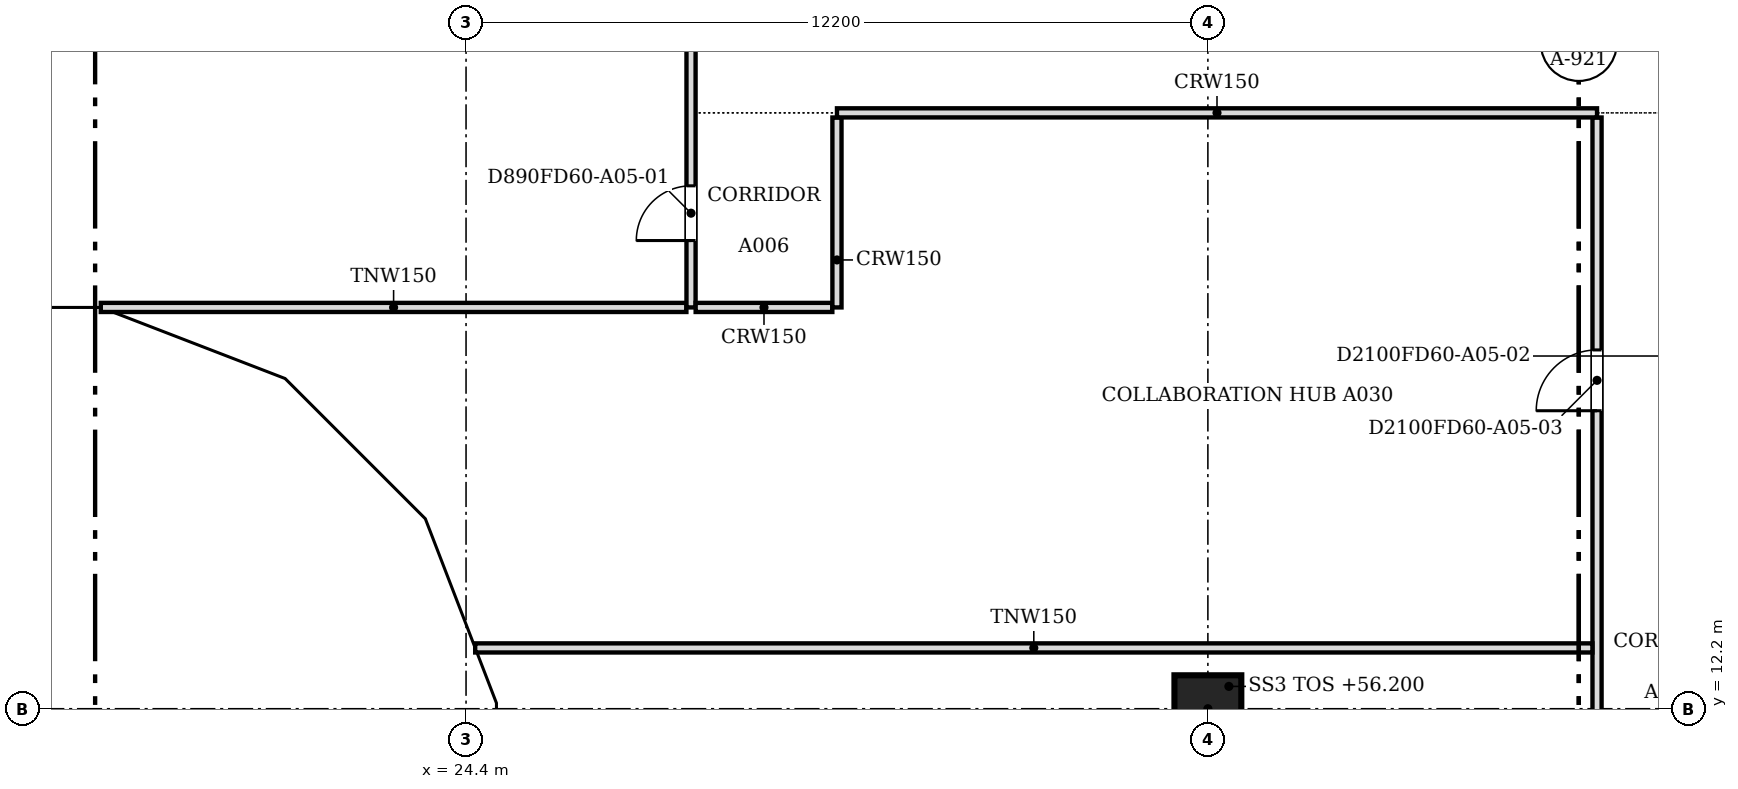
"""IFC4 building model, lengths in metres.
Left out: names, types, materials, properties, quantities, classifications, styles, units other than length and angle.
Written with IfcOpenShell. Run it as: python <this file> out.ifc"""

import sys

from ifc_helpers import new_model, si_unit, direction, frame, frame_2d, origin, origin_2d, place, context, subcontext, project, spatial, polyline, rectangle, outline, extrude, faceted_brep, source, transform, mapped, element, fill, save


model = new_model("IFC4")
c1 = context("Model", 3, precision=1e-05, world=origin(), true_north=direction((0.0, 1.0)))
c2 = subcontext(c1, "Body", "Model", "MODEL_VIEW")
j1 = project(units=[si_unit("LENGTHUNIT", "METRE"), si_unit("PLANEANGLEUNIT", "RADIAN")], contexts=[c1])
p1 = place(None, origin())
s1 = spatial("IfcSite", under=j1, at=p1, CompositionType="ELEMENT")
p2 = place(p1, origin())
s2 = spatial("IfcBuilding", under=s1, at=p2, CompositionType="ELEMENT")
p3 = place(p2, frame((0.0, 0.0, 56.2)))
s3 = spatial("IfcBuildingStorey", under=s2, at=p3, CompositionType="ELEMENT", Elevation=56.2)
p4 = place(p3, frame((36.6, 12.2, 0.0), z_axis=(0.0, 0.0, 1.0), x_axis=(1.0, 0.0, 0.0)))
e1 = element("IfcColumn", 1, at=p4, inside=s3, PredefinedType="COLUMN", context=c2, shape_type="SweptSolid", body=[
    extrude(rectangle(XDim=1.1, YDim=1.1, at=origin_2d()), origin(), (0.0, 0.0, 1.0), 3.6),
])
m1 = source(origin(), c2, "Body", "Brep", [
    faceted_brep([(3.05, -0.25, 7.543), (0.0, -0.25, 3.8), (3.05, -0.25, 0.057), (0.0, 0.25, 3.8), (3.096, 0.25, 7.6), (3.143, 0.25, 7.544), (3.143, 0.25, 0.056), (3.096, 0.25, 0.0), (3.096, -0.0, 0.0), (3.096, -0.0, 7.6)], [[[0, 1, 2]], [[3, 4, 5, 6, 7]], [[7, 6, 8]], [[5, 4, 9]], [[4, 3, 1, 0, 9]], [[3, 7, 8, 2, 1]], [[2, 8, 6, 5, 9, 0]]]),
])
p5 = place(p3, frame((15.25, 18.55, -3.8), z_axis=(0.0, 0.0, 1.0), x_axis=(1.0, 0.0, 0.0)))
e2 = element("IfcWall", 2, at=p5, inside=s3, PredefinedType="SOLIDWALL", context=c2, shape_type="MappedRepresentation", body=[
    mapped(m1, transform((0.0, 0.0, 0.0), scale=1.0)),
])
m2 = source(origin(), c2, "Body", "SweptSolid", [
    extrude(outline(polyline([(2.896, 6.959), (0.323, 3.8), (2.896, 0.641), (2.896, 6.959)])), frame((0.0, 0.26, 0.0), z_axis=(0.0, -1.0, 0.0), x_axis=(1.0, 0.0, 0.0)), (0.0, 0.0, 1.0), 0.52),
])
p6 = place(p5, origin())
e3 = element("IfcOpeningElement", 3, at=p6, cuts=e2, PredefinedType="OPENING", context=c2, shape_type="MappedRepresentation", body=[
    mapped(m2, transform((0.0, 0.0, 0.0), scale=1.0)),
])
m3 = source(origin(), c2, "Body", "Brep", [
    faceted_brep([(0.093, -0.25, 0.056), (3.143, -0.25, 3.736), (3.143, -0.25, 3.864), (0.093, -0.25, 7.544), (0.0, 0.25, 7.543), (0.047, 0.25, 7.6), (3.196, 0.25, 3.8), (0.047, 0.25, 0.0), (0.0, 0.25, 0.057), (3.196, -0.0, 3.8), (0.047, 0.0, 0.0), (0.047, 0.0, 7.6)], [[[0, 1, 2, 3]], [[4, 5, 6, 7, 8]], [[7, 6, 9, 1, 0, 10]], [[6, 5, 11, 3, 2, 9]], [[5, 4, 11]], [[8, 7, 10]], [[8, 10, 0, 3, 11, 4]], [[1, 9, 2]]]),
])
p7 = place(p3, frame((18.303, 18.567, -3.8), z_axis=(0.0, 0.0, 1.0), x_axis=(0.932978940178, -0.359930961693, 0.0)))
e4 = element("IfcWall", 4, at=p7, inside=s3, PredefinedType="SOLIDWALL", context=c2, shape_type="MappedRepresentation", body=[
    mapped(m3, transform((0.0, 0.0, 0.0), scale=1.0)),
])
m4 = source(origin(), c2, "Body", "SweptSolid", [
    extrude(outline(polyline([(0.247, 0.633), (2.871, 3.8), (0.247, 6.967), (0.247, 0.633)])), frame((0.0, 0.26, 0.0), z_axis=(0.0, -1.0, 0.0), x_axis=(1.0, 0.0, 0.0)), (0.0, 0.0, 1.0), 0.52),
])
p8 = place(p7, origin())
e5 = element("IfcOpeningElement", 5, at=p8, cuts=e4, PredefinedType="OPENING", context=c2, shape_type="MappedRepresentation", body=[
    mapped(m4, transform((0.0, 0.0, 0.0), scale=1.0)),
])
m5 = source(origin(), c2, "Body", "Brep", [
    faceted_brep([(3.103, -0.25, 7.536), (0.053, -0.25, 3.864), (0.053, -0.25, 3.736), (3.103, -0.25, 0.064), (0.0, 0.25, 3.8), (3.156, 0.25, 7.6), (3.209, 0.25, 7.536), (3.209, 0.25, 0.064), (3.156, 0.25, 0.0), (3.156, -0.0, 0.0), (3.156, -0.0, 7.6), (0.0, 0.0, 3.8)], [[[0, 1, 2, 3]], [[4, 5, 6, 7, 8]], [[8, 7, 9]], [[6, 5, 10]], [[5, 4, 11, 1, 0, 10]], [[4, 8, 9, 3, 2, 11]], [[11, 2, 1]], [[3, 9, 7, 6, 10, 0]]]),
])
p9 = place(p3, frame((21.285, 17.417, -3.8), z_axis=(0.0, 0.0, 1.0), x_axis=(0.707106781187, -0.707106781187, 0.0)))
e6 = element("IfcWall", 6, at=p9, inside=s3, PredefinedType="SOLIDWALL", context=c2, shape_type="MappedRepresentation", body=[
    mapped(m5, transform((0.0, 0.0, 0.0), scale=1.0)),
])
m6 = source(origin(), c2, "Body", "SweptSolid", [
    extrude(outline(polyline([(2.956, 6.968), (0.325, 3.8), (2.956, 0.632), (2.956, 6.968)])), frame((0.0, 0.26, 0.0), z_axis=(0.0, -1.0, 0.0), x_axis=(1.0, 0.0, 0.0)), (0.0, 0.0, 1.0), 0.52),
])
p10 = place(p9, origin())
e7 = element("IfcOpeningElement", 7, at=p10, cuts=e6, PredefinedType="OPENING", context=c2, shape_type="MappedRepresentation", body=[
    mapped(m6, transform((0.0, 0.0, 0.0), scale=1.0)),
])
m7 = source(origin(), c2, "Body", "Brep", [
    faceted_brep([(0.106, -0.25, 0.064), (3.156, -0.25, 3.744), (3.156, -0.25, 3.856), (0.106, -0.25, 7.536), (0.0, 0.25, 7.536), (0.053, 0.25, 7.6), (3.202, 0.25, 3.8), (0.053, 0.25, 0.0), (0.0, 0.25, 0.064), (3.202, -0.0, 3.8), (0.053, 0.0, 0.0), (0.053, 0.0, 7.6)], [[[0, 1, 2, 3]], [[4, 5, 6, 7, 8]], [[7, 6, 9, 1, 0, 10]], [[6, 5, 11, 3, 2, 9]], [[5, 4, 11]], [[8, 7, 10]], [[8, 10, 0, 3, 11, 4]], [[1, 9, 2]]]),
])
p11 = place(p3, frame((23.497, 15.234, -3.8), z_axis=(0.0, 0.0, 1.0), x_axis=(0.359913782069, -0.932985567668, 0.0)))
e8 = element("IfcWall", 8, at=p11, inside=s3, PredefinedType="SOLIDWALL", context=c2, shape_type="MappedRepresentation", body=[
    mapped(m7, transform((0.0, 0.0, 0.0), scale=1.0)),
])
m8 = source(origin(), c2, "Body", "SweptSolid", [
    extrude(outline(polyline([(0.253, 0.633), (2.878, 3.8), (0.253, 6.967), (0.253, 0.633)])), frame((0.0, 0.26, 0.0), z_axis=(0.0, -1.0, 0.0), x_axis=(1.0, 0.0, 0.0)), (0.0, 0.0, 1.0), 0.52),
])
p12 = place(p11, origin())
e9 = element("IfcOpeningElement", 9, at=p12, cuts=e8, PredefinedType="OPENING", context=c2, shape_type="MappedRepresentation", body=[
    mapped(m8, transform((0.0, 0.0, 0.0), scale=1.0)),
])
m9 = source(origin(), c2, "Body", "Brep", [
    faceted_brep([(3.096, -0.25, 0.0), (6.1, -0.25, 3.8), (3.096, -0.25, 7.6), (0.047, -0.25, 3.857), (0.047, -0.25, 3.743), (0.0, 0.25, 3.8), (3.096, 0.25, 7.6), (6.053, 0.25, 3.859), (6.053, 0.25, 3.741), (3.096, 0.25, 0.0), (6.1, -0.0, 3.8), (0.0, 0.0, 3.8)], [[[0, 1, 2, 3, 4]], [[5, 6, 7, 8, 9]], [[9, 8, 10, 1, 0]], [[7, 6, 2, 1, 10]], [[6, 5, 11, 3, 2]], [[5, 9, 0, 4, 11]], [[11, 4, 3]], [[10, 8, 7]]]),
])
p13 = place(p3, frame((24.65, 12.247, -3.8), z_axis=(0.0, 0.0, 1.0), x_axis=(0.0, -1.0, 0.0)))
e10 = element("IfcWall", 10, at=p13, inside=s3, PredefinedType="SOLIDWALL", context=c2, shape_type="MappedRepresentation", body=[
    mapped(m9, transform((0.0, 0.0, 0.0), scale=1.0)),
])
m10 = source(origin(), c2, "Body", "SweptSolid", [
    extrude(outline(polyline([(3.094, 0.399), (5.781, 3.8), (3.094, 7.201), (0.323, 3.8), (3.094, 0.399)])), frame((0.0, 0.26, 0.0), z_axis=(0.0, -1.0, 0.0), x_axis=(1.0, 0.0, 0.0)), (0.0, 0.0, 1.0), 0.52),
])
p14 = place(p13, origin())
e11 = element("IfcOpeningElement", 11, at=p14, cuts=e10, PredefinedType="OPENING", context=c2, shape_type="MappedRepresentation", body=[
    mapped(m10, transform((0.0, 0.0, 0.0), scale=1.0)),
])
p15 = place(p2, frame((0.0, 0.0, 60.0)))
s4 = spatial("IfcBuildingStorey", under=s2, at=p15, CompositionType="ELEMENT", Elevation=60.0)
m11 = source(origin(), c2, "Body", "Brep", [
    faceted_brep([(3.05, -0.25, 0.0), (6.1, -0.25, 3.743), (6.1, -0.25, 3.857), (3.05, -0.25, 7.6), (0.0, -0.25, 3.8), (0.0, 0.25, 3.8), (3.05, 0.25, 7.6), (6.146, 0.25, 3.8), (3.05, 0.25, 0.0), (6.146, -0.0, 3.8)], [[[0, 1, 2, 3, 4]], [[5, 6, 7, 8]], [[8, 7, 9, 1, 0]], [[7, 6, 3, 2, 9]], [[6, 5, 4, 3]], [[5, 8, 0, 4]], [[1, 9, 2]]]),
])
p16 = place(p15, frame((12.2, 18.55, -3.8), z_axis=(0.0, 0.0, 1.0), x_axis=(1.0, 0.0, 0.0)))
e12 = element("IfcWall", 12, at=p16, inside=s4, PredefinedType="SOLIDWALL", context=c2, shape_type="MappedRepresentation", body=[
    mapped(m11, transform((0.0, 0.0, 0.0), scale=1.0)),
])
m12 = source(origin(), c2, "Body", "SweptSolid", [
    extrude(outline(polyline([(3.052, 0.398), (5.824, 3.8), (3.052, 7.202), (0.321, 3.8), (3.052, 0.398)])), frame((0.0, 0.26, 0.0), z_axis=(0.0, -1.0, 0.0), x_axis=(1.0, 0.0, 0.0)), (0.0, 0.0, 1.0), 0.52),
])
p17 = place(p16, origin())
e13 = element("IfcOpeningElement", 13, at=p17, cuts=e12, PredefinedType="OPENING", context=c2, shape_type="MappedRepresentation", body=[
    mapped(m12, transform((0.0, 0.0, 0.0), scale=1.0)),
])
m13 = source(origin(), c2, "Body", "Brep", [
    faceted_brep([(3.096, -0.25, 7.536), (0.047, -0.25, 3.856), (0.047, -0.25, 3.744), (3.096, -0.25, 0.064), (0.0, 0.25, 3.8), (3.149, 0.25, 7.6), (3.202, 0.25, 7.536), (3.202, 0.25, 0.064), (3.149, 0.25, 0.0), (3.149, -0.0, 0.0), (3.149, -0.0, 7.6), (0.0, 0.0, 3.8)], [[[0, 1, 2, 3]], [[4, 5, 6, 7, 8]], [[8, 7, 9]], [[6, 5, 10]], [[5, 4, 11, 1, 0, 10]], [[4, 8, 9, 3, 2, 11]], [[11, 2, 1]], [[3, 9, 7, 6, 10, 0]]]),
])
p18 = place(p15, frame((18.346, 18.55, -3.8), z_axis=(0.0, 0.0, 1.0), x_axis=(0.932985567668, -0.359913782069, 0.0)))
e14 = element("IfcWall", 14, at=p18, inside=s4, PredefinedType="SOLIDWALL", context=c2, shape_type="MappedRepresentation", body=[
    mapped(m13, transform((0.0, 0.0, 0.0), scale=1.0)),
])
m14 = source(origin(), c2, "Body", "SweptSolid", [
    extrude(outline(polyline([(2.949, 6.967), (0.325, 3.8), (2.949, 0.633), (2.949, 6.967)])), frame((0.0, 0.26, 0.0), z_axis=(0.0, -1.0, 0.0), x_axis=(1.0, 0.0, 0.0)), (0.0, 0.0, 1.0), 0.52),
])
p19 = place(p18, origin())
e15 = element("IfcOpeningElement", 15, at=p19, cuts=e14, PredefinedType="OPENING", context=c2, shape_type="MappedRepresentation", body=[
    mapped(m14, transform((0.0, 0.0, 0.0), scale=1.0)),
])
m15 = source(origin(), c2, "Body", "Brep", [
    faceted_brep([(0.106, -0.25, 0.064), (3.156, -0.25, 3.736), (3.156, -0.25, 3.864), (0.106, -0.25, 7.536), (0.0, 0.25, 7.536), (0.053, 0.25, 7.6), (3.209, 0.25, 3.8), (0.053, 0.25, 0.0), (0.0, 0.25, 0.064), (3.209, -0.0, 3.8), (0.053, 0.0, 0.0), (0.053, 0.0, 7.6)], [[[0, 1, 2, 3]], [[4, 5, 6, 7, 8]], [[7, 6, 9, 1, 0, 10]], [[6, 5, 11, 3, 2, 9]], [[5, 4, 11]], [[8, 7, 10]], [[8, 10, 0, 3, 11, 4]], [[1, 9, 2]]]),
])
p20 = place(p15, frame((21.248, 17.454, -3.8), z_axis=(0.0, 0.0, 1.0), x_axis=(0.707106781187, -0.707106781187, 0.0)))
e16 = element("IfcWall", 16, at=p20, inside=s4, PredefinedType="SOLIDWALL", context=c2, shape_type="MappedRepresentation", body=[
    mapped(m15, transform((0.0, 0.0, 0.0), scale=1.0)),
])
m16 = source(origin(), c2, "Body", "SweptSolid", [
    extrude(outline(polyline([(0.253, 0.632), (2.884, 3.8), (0.253, 6.968), (0.253, 0.632)])), frame((0.0, 0.26, 0.0), z_axis=(0.0, -1.0, 0.0), x_axis=(1.0, 0.0, 0.0)), (0.0, 0.0, 1.0), 0.52),
])
p21 = place(p20, origin())
e17 = element("IfcOpeningElement", 17, at=p21, cuts=e16, PredefinedType="OPENING", context=c2, shape_type="MappedRepresentation", body=[
    mapped(m16, transform((0.0, 0.0, 0.0), scale=1.0)),
])
m17 = source(origin(), c2, "Body", "Brep", [
    faceted_brep([(3.103, -0.25, 7.544), (0.053, -0.25, 3.864), (0.053, -0.25, 3.736), (3.103, -0.25, 0.056), (0.0, 0.25, 3.8), (3.149, 0.25, 7.6), (3.196, 0.25, 7.543), (3.196, 0.25, 0.057), (3.149, 0.25, 0.0), (3.149, -0.0, 0.0), (3.149, -0.0, 7.6), (0.0, 0.0, 3.8)], [[[0, 1, 2, 3]], [[4, 5, 6, 7, 8]], [[8, 7, 9]], [[6, 5, 10]], [[5, 4, 11, 1, 0, 10]], [[4, 8, 9, 3, 2, 11]], [[11, 2, 1]], [[3, 9, 7, 6, 10, 0]]]),
])
p22 = place(p15, frame((23.517, 15.185, -3.8), z_axis=(0.0, 0.0, 1.0), x_axis=(0.359864468756, -0.933004589553, 0.0)))
e18 = element("IfcWall", 18, at=p22, inside=s4, PredefinedType="SOLIDWALL", context=c2, shape_type="MappedRepresentation", body=[
    mapped(m17, transform((0.0, 0.0, 0.0), scale=1.0)),
])
p23 = place(p22, origin())
e19 = element("IfcOpeningElement", 19, at=p23, cuts=e18, PredefinedType="OPENING", context=c2, shape_type="MappedRepresentation", body=[
    mapped(m14, transform((0.0, 0.0, 0.0), scale=1.0)),
])
m18 = source(origin(), c2, "Body", "Brep", [
    faceted_brep([(0.093, -0.25, 0.057), (3.143, -0.25, 3.8), (0.093, -0.25, 7.543), (0.0, 0.25, 7.544), (0.047, 0.25, 7.6), (3.143, 0.25, 3.8), (0.047, 0.25, 0.0), (0.0, 0.25, 0.056), (0.047, 0.0, 0.0), (0.047, 0.0, 7.6)], [[[0, 1, 2]], [[3, 4, 5, 6, 7]], [[6, 5, 1, 0, 8]], [[5, 4, 9, 2, 1]], [[4, 3, 9]], [[7, 6, 8]], [[7, 8, 0, 2, 9, 3]]]),
])
p24 = place(p15, frame((24.65, 12.293, -3.8), z_axis=(0.0, 0.0, 1.0), x_axis=(0.0, -1.0, 0.0)))
e20 = element("IfcWall", 20, at=p24, inside=s4, PredefinedType="SOLIDWALL", context=c2, shape_type="MappedRepresentation", body=[
    mapped(m18, transform((0.0, 0.0, 0.0), scale=1.0)),
])
m19 = source(origin(), c2, "Body", "SweptSolid", [
    extrude(outline(polyline([(0.247, 0.641), (2.821, 3.8), (0.247, 6.959), (0.247, 0.641)])), frame((0.0, 0.26, 0.0), z_axis=(0.0, -1.0, 0.0), x_axis=(1.0, 0.0, 0.0)), (0.0, 0.0, 1.0), 0.52),
])
p25 = place(p24, origin())
e21 = element("IfcOpeningElement", 21, at=p25, cuts=e20, PredefinedType="OPENING", context=c2, shape_type="MappedRepresentation", body=[
    mapped(m19, transform((0.0, 0.0, 0.0), scale=1.0)),
])
p26 = place(p3, frame((43.0, 0.5, 0.0), z_axis=(0.0, 0.0, 1.0), x_axis=(0.0, 1.0, 0.0)))
e22 = element("IfcWall", 22, at=p26, inside=s3, PredefinedType="PARTITIONING", context=c2, shape_type="SweptSolid", body=[
    extrude(rectangle(XDim=21.424, YDim=0.15, at=frame_2d((10.712, 0.0))), origin(), (0.0, 0.0, 1.0), 3.067),
])
m20 = source(origin(), c2, "Body", "SweptSolid", [
    extrude(rectangle(XDim=1.0, YDim=2.1, at=frame_2d((0.5, 1.05))), frame((0.0, 0.085, 0.0), z_axis=(0.0, -1.0, 0.0), x_axis=(1.0, 0.0, 0.0)), (0.0, 0.0, 1.0), 0.17),
])
p27 = place(p26, frame((16.601, 0.0, 0.0)))
e23 = element("IfcOpeningElement", 23, at=p27, cuts=e22, PredefinedType="OPENING", context=c2, shape_type="MappedRepresentation", body=[
    mapped(m20, transform((0.0, 0.0, 0.0), scale=1.0)),
])
p28 = place(p26, frame((7.7, 0.0, 0.0)))
e24 = element("IfcOpeningElement", 24, at=p28, cuts=e22, PredefinedType="OPENING", context=c2, shape_type="MappedRepresentation", body=[
    mapped(m20, transform((0.0, 0.0, 0.0), scale=1.0)),
])
p29 = place(p3, frame((24.55, 13.2, 0.0), z_axis=(0.0, 0.0, 1.0), x_axis=(1.0, 0.0, 0.0)))
e25 = element("IfcWall", 25, at=p29, inside=s3, PredefinedType="PARTITIONING", context=c2, shape_type="SweptSolid", body=[
    extrude(rectangle(XDim=18.374, YDim=0.15, at=frame_2d((9.187, 0.0))), origin(), (0.0, 0.0, 1.0), 3.067),
])
p30 = place(p3, frame((18.393, 18.8, 0.0), z_axis=(0.0, 0.0, 1.0), x_axis=(1.0, 0.0, 0.0)))
e26 = element("IfcWall", 26, at=p30, inside=s3, PredefinedType="PARTITIONING", context=c2, shape_type="SweptSolid", body=[
    extrude(rectangle(XDim=9.631, YDim=0.15, at=frame_2d((4.815, 0.0))), origin(), (0.0, 0.0, 1.0), 3.067),
])
p31 = place(p3, frame((28.1, 18.8, 0.0), z_axis=(0.0, 0.0, 1.0), x_axis=(0.0, 1.0, 0.0)))
e27 = element("IfcWall", 27, at=p31, inside=s3, PredefinedType="PARTITIONING", context=c2, shape_type="SweptSolid", body=[
    extrude(rectangle(XDim=26.5, YDim=0.15, at=frame_2d((13.25, 0.0))), origin(), (0.0, 0.0, 1.0), 3.067),
])
m21 = source(origin(), c2, "Body", "SweptSolid", [
    extrude(rectangle(XDim=0.9, YDim=2.1, at=frame_2d((0.45, 1.05))), frame((0.0, 0.085, 0.0), z_axis=(0.0, -1.0, 0.0), x_axis=(1.0, 0.0, 0.0)), (0.0, 0.0, 1.0), 0.17),
])
p32 = place(p31, frame((1.1, 0.0, 0.0)))
e28 = element("IfcOpeningElement", 28, at=p32, cuts=e27, PredefinedType="OPENING", context=c2, shape_type="MappedRepresentation", body=[
    mapped(m21, transform((0.0, 0.0, 0.0), scale=1.0)),
])
p33 = place(p31, frame((23.151, 0.0, 0.0)))
e29 = element("IfcOpeningElement", 29, at=p33, cuts=e27, PredefinedType="OPENING", context=c2, shape_type="MappedRepresentation", body=[
    mapped(m20, transform((0.0, 0.0, 0.0), scale=1.0)),
])
p34 = place(p31, frame((8.2, 0.0, 0.0)))
e30 = element("IfcOpeningElement", 30, at=p34, cuts=e27, PredefinedType="OPENING", context=c2, shape_type="MappedRepresentation", body=[
    mapped(m21, transform((0.0, 0.0, 0.0), scale=1.0)),
])
p35 = place(p31, frame((15.8, 0.0, 0.0)))
e31 = element("IfcOpeningElement", 31, at=p35, cuts=e27, PredefinedType="OPENING", context=c2, shape_type="MappedRepresentation", body=[
    mapped(m21, transform((0.0, 0.0, 0.0), scale=1.0)),
])
p36 = place(p3, frame((28.176, 18.8, 0.0), z_axis=(0.0, 0.0, 1.0), x_axis=(1.0, 0.0, 0.0)))
e32 = element("IfcWall", 32, at=p36, inside=s3, PredefinedType="PARTITIONING", context=c2, shape_type="SweptSolid", body=[
    extrude(rectangle(XDim=2.248, YDim=0.15, at=frame_2d((1.124, 0.0))), origin(), (0.0, 0.0, 1.0), 3.067),
])
p37 = place(p3, frame((30.5, 18.8, 0.0), z_axis=(0.0, 0.0, 1.0), x_axis=(0.0, 1.0, 0.0)))
e33 = element("IfcWall", 33, at=p37, inside=s3, PredefinedType="PARTITIONING", context=c2, shape_type="SweptSolid", body=[
    extrude(rectangle(XDim=3.124, YDim=0.15, at=frame_2d((1.562, 0.0))), origin(), (0.0, 0.0, 1.0), 3.067),
])
p38 = place(p3, frame((30.5, 22.0, 0.0), z_axis=(0.0, 0.0, 1.0), x_axis=(1.0, 0.0, 0.0)))
e34 = element("IfcWall", 34, at=p38, inside=s3, PredefinedType="PARTITIONING", context=c2, shape_type="SweptSolid", body=[
    extrude(rectangle(XDim=12.5, YDim=0.15, at=frame_2d((6.25, 0.0))), origin(), (0.0, 0.0, 1.0), 3.067),
])
m22 = source(origin(), c2, "Body", "SweptSolid", [
    extrude(rectangle(XDim=0.9, YDim=2.1, at=frame_2d((0.45, 1.05))), frame((0.0, 0.025, 0.0), z_axis=(0.0, -1.0, 0.0), x_axis=(1.0, 0.0, 0.0)), (0.0, 0.0, 1.0), 0.05),
])
p39 = place(p32, origin())
e35 = element("IfcDoor", 35, at=p39, inside=s3, OperationType="SINGLE_SWING_LEFT", PredefinedType="DOOR", context=c2, shape_type="MappedRepresentation", body=[
    mapped(m22, transform((0.0, 0.0, 0.0), scale=1.0)),
])
fill(e28, e35)
m23 = source(origin(), c2, "Body", "SweptSolid", [
    extrude(rectangle(XDim=1.0, YDim=2.1, at=frame_2d((0.5, 1.05))), frame((0.0, 0.025, 0.0), z_axis=(0.0, -1.0, 0.0), x_axis=(1.0, 0.0, 0.0)), (0.0, 0.0, 1.0), 0.05),
])
p40 = place(p27, origin())
e36 = element("IfcDoor", 36, at=p40, inside=s3, OperationType="SINGLE_SWING_LEFT", PredefinedType="DOOR", context=c2, shape_type="MappedRepresentation", body=[
    mapped(m23, transform((0.0, 0.0, 0.0), scale=1.0)),
])
fill(e23, e36)
save(model, sys.argv[1])
